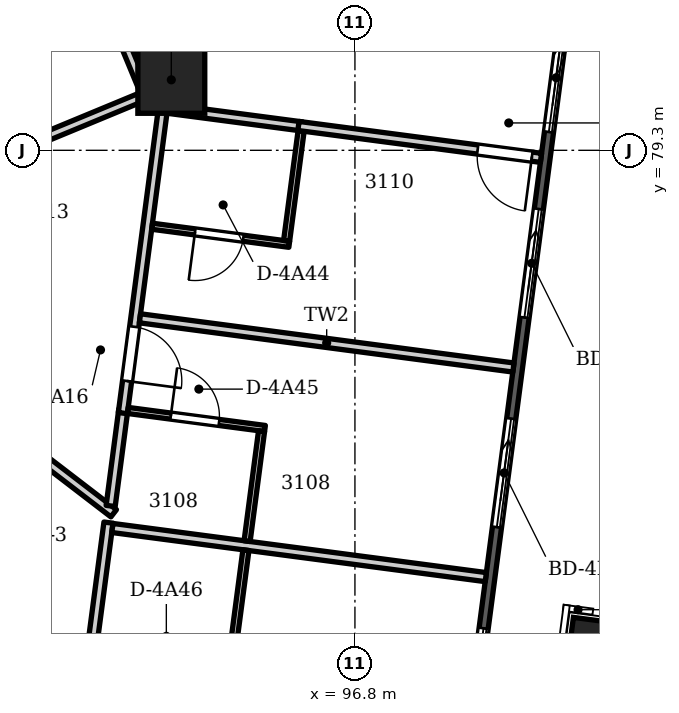
"""IFC4 building model, lengths in metres.
Left out: names, types, materials, properties, quantities, classifications, styles, units other than length and angle.
Written with IfcOpenShell. Run it as: python <this file> out.ifc"""

import sys

from ifc_helpers import new_model, si_unit, direction, frame, frame_2d, origin, origin_2d, place, context, subcontext, project, spatial, polyline, rectangle, circle, outline, extrude, element, fill, save


model = new_model("IFC4")
c1 = context("Model", 3, precision=1e-05, world=origin(), true_north=direction((0.0, 1.0)))
c2 = subcontext(c1, "Body", "Model", "MODEL_VIEW")
j1 = project(units=[si_unit("LENGTHUNIT", "METRE"), si_unit("PLANEANGLEUNIT", "RADIAN")], contexts=[c1])
p1 = place(None, origin())
s1 = spatial("IfcSite", under=j1, at=p1, CompositionType="ELEMENT")
p2 = place(p1, origin())
s2 = spatial("IfcBuilding", under=s1, at=p2, CompositionType="ELEMENT")
p3 = place(p2, frame((0.0, 0.0, 124.2)))
s3 = spatial("IfcBuildingStorey", under=s2, at=p3, CompositionType="ELEMENT", Elevation=124.2)
p4 = place(p3, frame((100.666, 71.205, -0.35), z_axis=(0.0, 0.0, 1.0), x_axis=(0.13052619222, 0.991444861374, 0.0)))
e1 = element("IfcColumn", 1, at=p4, inside=s3, PredefinedType="COLUMN", context=c2, shape_type="SweptSolid", body=[
    extrude(rectangle(XDim=0.75, YDim=0.65, at=origin_2d()), origin(), (0.0, 0.0, 1.0), 3.95),
])
p5 = place(p3, frame((93.78, 80.459, -0.35), z_axis=(0.0, 0.0, 1.0), x_axis=(1.0, 0.0, 0.0)))
e2 = element("IfcColumn", 2, at=p5, inside=s3, PredefinedType="COLUMN", context=c2, shape_type="SweptSolid", body=[
    extrude(circle(Radius=0.55, at=origin_2d()), origin(), (0.0, 0.0, 1.0), 3.95),
])
p6 = place(p3, frame((52.387, 70.1, 0.0), z_axis=(0.0, 0.0, 1.0), x_axis=(0.92388051416, 0.382681062447, 0.0)))
e3 = element("IfcWall", 3, at=p6, inside=s3, PredefinedType="SOLIDWALL", context=c2, shape_type="SweptSolid", body=[
    extrude(outline(polyline([(0.149, 0.075), (0.149, -0.075), (45.057, -0.075), (45.057, 0.075), (0.149, 0.075)])), origin(), (0.0, 0.0, 1.0), 3.3),
])
p7 = place(p6, frame((1.239, 0.0, 0.0)))
e4 = element("IfcOpeningElement", 4, at=p7, cuts=e3, PredefinedType="OPENING", context=c2, shape_type="SweptSolid", body=[
    extrude(rectangle(XDim=1.8, YDim=2.6, at=frame_2d((0.9, 1.3))), frame((0.0, 0.085, 0.0), z_axis=(0.0, -1.0, 0.0), x_axis=(1.0, 0.0, 0.0)), (0.0, 0.0, 1.0), 0.17),
])
p8 = place(p6, frame((4.316, 0.0, 0.0)))
e5 = element("IfcOpeningElement", 5, at=p8, cuts=e3, PredefinedType="OPENING", context=c2, shape_type="SweptSolid", body=[
    extrude(rectangle(XDim=1.8, YDim=2.6, at=frame_2d((0.9, 1.3))), frame((0.0, 0.085, 0.0), z_axis=(0.0, -1.0, 0.0), x_axis=(1.0, 0.0, 0.0)), (0.0, 0.0, 1.0), 0.17),
])
p9 = place(p6, frame((7.793, 0.0, 0.0)))
e6 = element("IfcOpeningElement", 6, at=p9, cuts=e3, PredefinedType="OPENING", context=c2, shape_type="SweptSolid", body=[
    extrude(rectangle(XDim=1.8, YDim=2.6, at=frame_2d((0.9, 1.3))), frame((0.0, 0.085, 0.0), z_axis=(0.0, -1.0, 0.0), x_axis=(1.0, 0.0, 0.0)), (0.0, 0.0, 1.0), 0.17),
])
p10 = place(p6, frame((11.271, 0.0, 0.0)))
e7 = element("IfcOpeningElement", 7, at=p10, cuts=e3, PredefinedType="OPENING", context=c2, shape_type="SweptSolid", body=[
    extrude(rectangle(XDim=1.8, YDim=2.6, at=frame_2d((0.9, 1.3))), frame((0.0, 0.085, 0.0), z_axis=(0.0, -1.0, 0.0), x_axis=(1.0, 0.0, 0.0)), (0.0, 0.0, 1.0), 0.17),
])
p11 = place(p6, frame((14.748, 0.0, 0.0)))
e8 = element("IfcOpeningElement", 8, at=p11, cuts=e3, PredefinedType="OPENING", context=c2, shape_type="SweptSolid", body=[
    extrude(rectangle(XDim=1.8, YDim=2.6, at=frame_2d((0.9, 1.3))), frame((0.0, 0.085, 0.0), z_axis=(0.0, -1.0, 0.0), x_axis=(1.0, 0.0, 0.0)), (0.0, 0.0, 1.0), 0.17),
])
p12 = place(p6, frame((18.226, 0.0, 0.0)))
e9 = element("IfcOpeningElement", 9, at=p12, cuts=e3, PredefinedType="OPENING", context=c2, shape_type="SweptSolid", body=[
    extrude(rectangle(XDim=1.8, YDim=2.6, at=frame_2d((0.9, 1.3))), frame((0.0, 0.085, 0.0), z_axis=(0.0, -1.0, 0.0), x_axis=(1.0, 0.0, 0.0)), (0.0, 0.0, 1.0), 0.17),
])
p13 = place(p6, frame((21.703, 0.0, 0.0)))
e10 = element("IfcOpeningElement", 10, at=p13, cuts=e3, PredefinedType="OPENING", context=c2, shape_type="SweptSolid", body=[
    extrude(rectangle(XDim=1.8, YDim=2.6, at=frame_2d((0.9, 1.3))), frame((0.0, 0.085, 0.0), z_axis=(0.0, -1.0, 0.0), x_axis=(1.0, 0.0, 0.0)), (0.0, 0.0, 1.0), 0.17),
])
p14 = place(p6, frame((25.18, 0.0, 0.0)))
e11 = element("IfcOpeningElement", 11, at=p14, cuts=e3, PredefinedType="OPENING", context=c2, shape_type="SweptSolid", body=[
    extrude(rectangle(XDim=1.8, YDim=2.6, at=frame_2d((0.9, 1.3))), frame((0.0, 0.085, 0.0), z_axis=(0.0, -1.0, 0.0), x_axis=(1.0, 0.0, 0.0)), (0.0, 0.0, 1.0), 0.17),
])
p15 = place(p6, frame((28.658, 0.0, 0.0)))
e12 = element("IfcOpeningElement", 12, at=p15, cuts=e3, PredefinedType="OPENING", context=c2, shape_type="SweptSolid", body=[
    extrude(rectangle(XDim=1.8, YDim=2.6, at=frame_2d((0.9, 1.3))), frame((0.0, 0.085, 0.0), z_axis=(0.0, -1.0, 0.0), x_axis=(1.0, 0.0, 0.0)), (0.0, 0.0, 1.0), 0.17),
])
p16 = place(p6, frame((32.135, 0.0, 0.0)))
e13 = element("IfcOpeningElement", 13, at=p16, cuts=e3, PredefinedType="OPENING", context=c2, shape_type="SweptSolid", body=[
    extrude(rectangle(XDim=1.8, YDim=2.6, at=frame_2d((0.9, 1.3))), frame((0.0, 0.085, 0.0), z_axis=(0.0, -1.0, 0.0), x_axis=(1.0, 0.0, 0.0)), (0.0, 0.0, 1.0), 0.17),
])
p17 = place(p6, frame((35.613, 0.0, 0.0)))
e14 = element("IfcOpeningElement", 14, at=p17, cuts=e3, PredefinedType="OPENING", context=c2, shape_type="SweptSolid", body=[
    extrude(rectangle(XDim=1.8, YDim=2.6, at=frame_2d((0.9, 1.3))), frame((0.0, 0.085, 0.0), z_axis=(0.0, -1.0, 0.0), x_axis=(1.0, 0.0, 0.0)), (0.0, 0.0, 1.0), 0.17),
])
p18 = place(p6, frame((39.09, 0.0, 0.0)))
e15 = element("IfcOpeningElement", 15, at=p18, cuts=e3, PredefinedType="OPENING", context=c2, shape_type="SweptSolid", body=[
    extrude(rectangle(XDim=1.8, YDim=2.6, at=frame_2d((0.9, 1.3))), frame((0.0, 0.085, 0.0), z_axis=(0.0, -1.0, 0.0), x_axis=(1.0, 0.0, 0.0)), (0.0, 0.0, 1.0), 0.17),
])
p19 = place(p6, frame((42.167, 0.0, 0.0)))
e16 = element("IfcOpeningElement", 16, at=p19, cuts=e3, PredefinedType="OPENING", context=c2, shape_type="SweptSolid", body=[
    extrude(rectangle(XDim=1.8, YDim=2.6, at=frame_2d((0.9, 1.3))), frame((0.0, 0.085, 0.0), z_axis=(0.0, -1.0, 0.0), x_axis=(1.0, 0.0, 0.0)), (0.0, 0.0, 1.0), 0.17),
])
p20 = place(p3, frame((100.388, 82.614, 0.0), z_axis=(0.0, 0.0, 1.0), x_axis=(-0.130522128443, -0.991445396372, 0.0)))
e17 = element("IfcWall", 17, at=p20, inside=s3, PredefinedType="SOLIDWALL", context=c2, shape_type="SweptSolid", body=[
    extrude(outline(polyline([(0.149, 0.075), (0.149, -0.075), (45.057, -0.075), (45.057, 0.075), (0.149, 0.075)])), origin(), (0.0, 0.0, 1.0), 3.3),
])
p21 = place(p20, frame((1.239, 0.0, 0.0)))
e18 = element("IfcOpeningElement", 18, at=p21, cuts=e17, PredefinedType="OPENING", context=c2, shape_type="SweptSolid", body=[
    extrude(rectangle(XDim=1.8, YDim=2.6, at=frame_2d((0.9, 1.3))), frame((0.0, 0.085, 0.0), z_axis=(0.0, -1.0, 0.0), x_axis=(1.0, 0.0, 0.0)), (0.0, 0.0, 1.0), 0.17),
])
p22 = place(p20, frame((4.316, 0.0, 0.0)))
e19 = element("IfcOpeningElement", 19, at=p22, cuts=e17, PredefinedType="OPENING", context=c2, shape_type="SweptSolid", body=[
    extrude(rectangle(XDim=1.8, YDim=2.6, at=frame_2d((0.9, 1.3))), frame((0.0, 0.085, 0.0), z_axis=(0.0, -1.0, 0.0), x_axis=(1.0, 0.0, 0.0)), (0.0, 0.0, 1.0), 0.17),
])
p23 = place(p20, frame((7.793, 0.0, 0.0)))
e20 = element("IfcOpeningElement", 20, at=p23, cuts=e17, PredefinedType="OPENING", context=c2, shape_type="SweptSolid", body=[
    extrude(rectangle(XDim=1.8, YDim=2.6, at=frame_2d((0.9, 1.3))), frame((0.0, 0.085, 0.0), z_axis=(0.0, -1.0, 0.0), x_axis=(1.0, 0.0, 0.0)), (0.0, 0.0, 1.0), 0.17),
])
p24 = place(p20, frame((11.271, 0.0, 0.0)))
e21 = element("IfcOpeningElement", 21, at=p24, cuts=e17, PredefinedType="OPENING", context=c2, shape_type="SweptSolid", body=[
    extrude(rectangle(XDim=1.8, YDim=2.6, at=frame_2d((0.9, 1.3))), frame((0.0, 0.085, 0.0), z_axis=(0.0, -1.0, 0.0), x_axis=(1.0, 0.0, 0.0)), (0.0, 0.0, 1.0), 0.17),
])
p25 = place(p20, frame((14.748, 0.0, 0.0)))
e22 = element("IfcOpeningElement", 22, at=p25, cuts=e17, PredefinedType="OPENING", context=c2, shape_type="SweptSolid", body=[
    extrude(rectangle(XDim=1.8, YDim=2.6, at=frame_2d((0.9, 1.3))), frame((0.0, 0.085, 0.0), z_axis=(0.0, -1.0, 0.0), x_axis=(1.0, 0.0, 0.0)), (0.0, 0.0, 1.0), 0.17),
])
p26 = place(p20, frame((18.226, 0.0, 0.0)))
e23 = element("IfcOpeningElement", 23, at=p26, cuts=e17, PredefinedType="OPENING", context=c2, shape_type="SweptSolid", body=[
    extrude(rectangle(XDim=1.8, YDim=2.6, at=frame_2d((0.9, 1.3))), frame((0.0, 0.085, 0.0), z_axis=(0.0, -1.0, 0.0), x_axis=(1.0, 0.0, 0.0)), (0.0, 0.0, 1.0), 0.17),
])
p27 = place(p20, frame((21.703, 0.0, 0.0)))
e24 = element("IfcOpeningElement", 24, at=p27, cuts=e17, PredefinedType="OPENING", context=c2, shape_type="SweptSolid", body=[
    extrude(rectangle(XDim=1.8, YDim=2.6, at=frame_2d((0.9, 1.3))), frame((0.0, 0.085, 0.0), z_axis=(0.0, -1.0, 0.0), x_axis=(1.0, 0.0, 0.0)), (0.0, 0.0, 1.0), 0.17),
])
p28 = place(p20, frame((25.18, 0.0, 0.0)))
e25 = element("IfcOpeningElement", 25, at=p28, cuts=e17, PredefinedType="OPENING", context=c2, shape_type="SweptSolid", body=[
    extrude(rectangle(XDim=1.8, YDim=2.6, at=frame_2d((0.9, 1.3))), frame((0.0, 0.085, 0.0), z_axis=(0.0, -1.0, 0.0), x_axis=(1.0, 0.0, 0.0)), (0.0, 0.0, 1.0), 0.17),
])
p29 = place(p20, frame((28.658, 0.0, 0.0)))
e26 = element("IfcOpeningElement", 26, at=p29, cuts=e17, PredefinedType="OPENING", context=c2, shape_type="SweptSolid", body=[
    extrude(rectangle(XDim=1.8, YDim=2.6, at=frame_2d((0.9, 1.3))), frame((0.0, 0.085, 0.0), z_axis=(0.0, -1.0, 0.0), x_axis=(1.0, 0.0, 0.0)), (0.0, 0.0, 1.0), 0.17),
])
p30 = place(p20, frame((32.135, 0.0, 0.0)))
e27 = element("IfcOpeningElement", 27, at=p30, cuts=e17, PredefinedType="OPENING", context=c2, shape_type="SweptSolid", body=[
    extrude(rectangle(XDim=1.8, YDim=2.6, at=frame_2d((0.9, 1.3))), frame((0.0, 0.085, 0.0), z_axis=(0.0, -1.0, 0.0), x_axis=(1.0, 0.0, 0.0)), (0.0, 0.0, 1.0), 0.17),
])
p31 = place(p20, frame((35.613, 0.0, 0.0)))
e28 = element("IfcOpeningElement", 28, at=p31, cuts=e17, PredefinedType="OPENING", context=c2, shape_type="SweptSolid", body=[
    extrude(rectangle(XDim=1.8, YDim=2.6, at=frame_2d((0.9, 1.3))), frame((0.0, 0.085, 0.0), z_axis=(0.0, -1.0, 0.0), x_axis=(1.0, 0.0, 0.0)), (0.0, 0.0, 1.0), 0.17),
])
p32 = place(p20, frame((39.09, 0.0, 0.0)))
e29 = element("IfcOpeningElement", 29, at=p32, cuts=e17, PredefinedType="OPENING", context=c2, shape_type="SweptSolid", body=[
    extrude(rectangle(XDim=1.8, YDim=2.6, at=frame_2d((0.9, 1.3))), frame((0.0, 0.085, 0.0), z_axis=(0.0, -1.0, 0.0), x_axis=(1.0, 0.0, 0.0)), (0.0, 0.0, 1.0), 0.17),
])
p33 = place(p20, frame((42.167, 0.0, 0.0)))
e30 = element("IfcOpeningElement", 30, at=p33, cuts=e17, PredefinedType="OPENING", context=c2, shape_type="SweptSolid", body=[
    extrude(rectangle(XDim=1.8, YDim=2.6, at=frame_2d((0.9, 1.3))), frame((0.0, 0.085, 0.0), z_axis=(0.0, -1.0, 0.0), x_axis=(1.0, 0.0, 0.0)), (0.0, 0.0, 1.0), 0.17),
])
p34 = place(p3, origin())
e31 = element("IfcWall", 31, at=p34, inside=s3, PredefinedType="PARAPET", context=c2, shape_type="SweptSolid", body=[
    extrude(outline(polyline([(99.222, 55.637), (107.395, 84.139), (107.059, 84.055), (99.487, 57.649), (99.222, 55.637)])), origin(), (0.0, 0.0, 1.0), 1.1),
])
p35 = place(p3, frame((87.26, 77.607, 0.0), z_axis=(0.0, 0.0, 1.0), x_axis=(0.79336631803, -0.608744515718, 0.0)))
e32 = element("IfcWall", 32, at=p35, inside=s3, PredefinedType="PARTITIONING", context=c2, shape_type="SweptSolid", body=[
    extrude(rectangle(XDim=7.024, YDim=0.15, at=frame_2d((3.512, 0.0))), origin(), (0.0, 0.0, 1.0), 2.7),
])
p36 = place(p35, frame((1.086, 0.0, 0.0)))
e33 = element("IfcOpeningElement", 33, at=p36, cuts=e32, PredefinedType="OPENING", context=c2, shape_type="SweptSolid", body=[
    extrude(rectangle(XDim=1.8, YDim=2.1, at=frame_2d((0.9, 1.05))), frame((0.0, 0.085, 0.0), z_axis=(0.0, -1.0, 0.0), x_axis=(1.0, 0.0, 0.0)), (0.0, 0.0, 1.0), 0.17),
])
p37 = place(p3, frame((88.693, 78.272, 0.0), z_axis=(0.0, 0.0, 1.0), x_axis=(0.92395946552, 0.382490399978, 0.0)))
e34 = element("IfcWall", 34, at=p37, inside=s3, PredefinedType="PARTITIONING", context=c2, shape_type="SweptSolid", body=[
    extrude(rectangle(XDim=5.134, YDim=0.15, at=frame_2d((2.567, 0.0))), origin(), (0.0, 0.0, 1.0), 2.8),
])
p38 = place(p37, frame((0.531, 0.0, 0.0)))
e35 = element("IfcOpeningElement", 35, at=p38, cuts=e34, PredefinedType="OPENING", context=c2, shape_type="SweptSolid", body=[
    extrude(rectangle(XDim=0.9, YDim=2.1, at=frame_2d((0.45, 1.05))), frame((0.0, 0.085, 0.0), z_axis=(0.0, -1.0, 0.0), x_axis=(1.0, 0.0, 0.0)), (0.0, 0.0, 1.0), 0.17),
])
p39 = place(p3, frame((92.486, 82.336, 0.0), z_axis=(0.0, 0.0, 1.0), x_axis=(0.382374366103, -0.924007491391, 0.0)))
e36 = element("IfcWall", 36, at=p39, inside=s3, PredefinedType="PARTITIONING", context=c2, shape_type="SweptSolid", body=[
    extrude(rectangle(XDim=2.229, YDim=0.15, at=frame_2d((1.115, 0.0))), origin(), (0.0, 0.0, 1.0), 3.3),
])
p40 = place(p3, frame((92.49, 71.23, 0.0), z_axis=(0.0, 0.0, 1.0), x_axis=(0.130747069904, 0.991415757244, 0.0)))
e37 = element("IfcWall", 37, at=p40, inside=s3, PredefinedType="PARTITIONING", context=c2, shape_type="SweptSolid", body=[
    extrude(rectangle(XDim=1.964, YDim=0.15, at=frame_2d((0.982, 0.0))), origin(), (0.0, 0.0, 1.0), 3.3),
])
p41 = place(p3, frame((92.811, 73.089, 0.0), z_axis=(0.0, 0.0, 1.0), x_axis=(0.991458051546, -0.130425963766, 0.0)))
e38 = element("IfcWall", 38, at=p41, inside=s3, PredefinedType="PARTITIONING", context=c2, shape_type="SweptSolid", body=[
    extrude(rectangle(XDim=6.194, YDim=0.15, at=frame_2d((3.097, 0.0))), origin(), (0.0, 0.0, 1.0), 3.3),
])
p42 = place(p3, frame((92.783, 73.451, 0.0), z_axis=(0.0, 0.0, 1.0), x_axis=(0.130312245432, 0.991473004519, 0.0)))
e39 = element("IfcWall", 39, at=p42, inside=s3, PredefinedType="PARTITIONING", context=c2, shape_type="SweptSolid", body=[
    extrude(rectangle(XDim=1.598, YDim=0.15, at=frame_2d((0.799, 0.0))), origin(), (0.0, 0.0, 1.0), 3.3),
])
p43 = place(p3, frame((92.983, 74.979, 0.0), z_axis=(0.0, 0.0, 1.0), x_axis=(0.130587368937, 0.991436805386, 0.0)))
e40 = element("IfcWall", 40, at=p43, inside=s3, PredefinedType="PARTITIONING", context=c2, shape_type="SweptSolid", body=[
    extrude(rectangle(XDim=5.134, YDim=0.15, at=frame_2d((2.567, 0.0))), origin(), (0.0, 0.0, 1.0), 2.8),
])
p44 = place(p43, frame((0.532, 0.0, 0.0)))
e41 = element("IfcOpeningElement", 41, at=p44, cuts=e40, PredefinedType="OPENING", context=c2, shape_type="SweptSolid", body=[
    extrude(rectangle(XDim=0.9, YDim=2.1, at=frame_2d((0.45, 1.05))), frame((0.0, 0.085, 0.0), z_axis=(0.0, -1.0, 0.0), x_axis=(1.0, 0.0, 0.0)), (0.0, 0.0, 1.0), 0.17),
])
p45 = place(p3, frame((93.065, 75.022, 0.0), z_axis=(0.0, 0.0, 1.0), x_axis=(0.991459774706, -0.130412864162, 0.0)))
e42 = element("IfcWall", 42, at=p45, inside=s3, PredefinedType="PARTITIONING", context=c2, shape_type="SweptSolid", body=[
    extrude(rectangle(XDim=2.275, YDim=0.1, at=frame_2d((1.137, 0.0))), origin(), (0.0, 0.0, 1.0), 3.3),
])
p46 = place(p45, frame((0.712, 0.0, 0.0)))
e43 = element("IfcOpeningElement", 43, at=p46, cuts=e42, PredefinedType="OPENING", context=c2, shape_type="SweptSolid", body=[
    extrude(rectangle(XDim=0.8, YDim=2.1, at=frame_2d((0.4, 1.05))), frame((0.0, 0.06, 0.0), z_axis=(0.0, -1.0, 0.0), x_axis=(1.0, 0.0, 0.0)), (0.0, 0.0, 1.0), 0.12),
])
p47 = place(p3, frame((93.264, 76.537, 0.0), z_axis=(0.0, 0.0, 1.0), x_axis=(0.991439668145, -0.130565632649, 0.0)))
e44 = element("IfcWall", 44, at=p47, inside=s3, PredefinedType="PARTITIONING", context=c2, shape_type="SweptSolid", body=[
    extrude(rectangle(XDim=6.195, YDim=0.15, at=frame_2d((3.097, 0.0))), origin(), (0.0, 0.0, 1.0), 3.3),
])
p48 = place(p3, frame((93.464, 78.051, 0.0), z_axis=(0.0, 0.0, 1.0), x_axis=(0.991445890878, -0.130518372124, 0.0)))
e45 = element("IfcWall", 45, at=p48, inside=s3, PredefinedType="PARTITIONING", context=c2, shape_type="SweptSolid", body=[
    extrude(rectangle(XDim=2.275, YDim=0.1, at=frame_2d((1.137, 0.0))), origin(), (0.0, 0.0, 1.0), 3.3),
])
p49 = place(p48, frame((0.712, 0.0, 0.0)))
e46 = element("IfcOpeningElement", 46, at=p49, cuts=e45, PredefinedType="OPENING", context=c2, shape_type="SweptSolid", body=[
    extrude(rectangle(XDim=0.8, YDim=2.1, at=frame_2d((0.4, 1.05))), frame((0.0, 0.06, 0.0), z_axis=(0.0, -1.0, 0.0), x_axis=(1.0, 0.0, 0.0)), (0.0, 0.0, 1.0), 0.12),
])
p50 = place(p3, frame((93.719, 79.984, 0.0), z_axis=(0.0, 0.0, 1.0), x_axis=(0.991444602233, -0.130528160577, 0.0)))
e47 = element("IfcWall", 47, at=p50, inside=s3, PredefinedType="PARTITIONING", context=c2, shape_type="SweptSolid", body=[
    extrude(rectangle(XDim=2.229, YDim=0.15, at=frame_2d((1.115, 0.0))), origin(), (0.0, 0.0, 1.0), 3.3),
])
p51 = place(p3, frame((94.742, 70.717, 0.0), z_axis=(0.0, 0.0, 1.0), x_axis=(0.130663420693, 0.991426785241, 0.0)))
e48 = element("IfcWall", 48, at=p51, inside=s3, PredefinedType="PARTITIONING", context=c2, shape_type="SweptSolid", body=[
    extrude(rectangle(XDim=2.025, YDim=0.1, at=frame_2d((1.013, 0.0))), origin(), (0.0, 0.0, 1.0), 3.3),
])
for number, where, z_axis, x_axis in (
    (49, (95.027, 72.873, 0.0), (0.0, 0.0, 1.0), (0.13, 0.991, 0.0)),
    (50, (95.677, 77.811, 0.0), (0.0, 0.0, 1.0), (0.131, 0.991, 0.0)),
):
    element("IfcWall", number, at=place(p3, frame(where, z_axis=z_axis, x_axis=x_axis)), inside=s3, PredefinedType="PARTITIONING", context=c2, shape_type="SweptSolid", body=[
        extrude(rectangle(XDim=1.825, YDim=0.1, at=frame_2d((0.912, 0.0))), origin(), (0.0, 0.0, 1.0), 3.3),
    ])
p52 = place(p3, frame((95.871, 79.7, 0.0), z_axis=(0.0, 0.0, 1.0), x_axis=(0.991472672227, -0.130314773632, 0.0)))
e51 = element("IfcWall", 51, at=p52, inside=s3, PredefinedType="PARTITIONING", context=c2, shape_type="SweptSolid", body=[
    extrude(rectangle(XDim=4.022, YDim=0.15, at=frame_2d((2.011, 0.0))), origin(), (0.0, 0.0, 1.0), 3.3),
])
p53 = place(p52, frame((2.972, 0.0, 0.0)))
e52 = element("IfcOpeningElement", 52, at=p53, cuts=e51, PredefinedType="OPENING", context=c2, shape_type="SweptSolid", body=[
    extrude(rectangle(XDim=0.9, YDim=2.1, at=frame_2d((0.45, 1.05))), frame((0.0, 0.085, 0.0), z_axis=(0.0, -1.0, 0.0), x_axis=(1.0, 0.0, 0.0)), (0.0, 0.0, 1.0), 0.17),
])
p54 = place(p21, origin())
e53 = element("IfcDoor", 53, at=p54, inside=s3, OperationType="SLIDING_TO_LEFT", PredefinedType="DOOR", context=c2, shape_type="SweptSolid", body=[
    extrude(rectangle(XDim=1.8, YDim=2.6, at=frame_2d((0.9, 1.3))), frame((0.0, 0.025, 0.0), z_axis=(0.0, -1.0, 0.0), x_axis=(1.0, 0.0, 0.0)), (0.0, 0.0, 1.0), 0.05),
])
fill(e18, e53)
p55 = place(p22, origin())
e54 = element("IfcDoor", 54, at=p55, inside=s3, OperationType="SLIDING_TO_LEFT", PredefinedType="DOOR", context=c2, shape_type="SweptSolid", body=[
    extrude(rectangle(XDim=1.8, YDim=2.6, at=frame_2d((0.9, 1.3))), frame((0.0, 0.025, 0.0), z_axis=(0.0, -1.0, 0.0), x_axis=(1.0, 0.0, 0.0)), (0.0, 0.0, 1.0), 0.05),
])
fill(e19, e54)
p56 = place(p23, origin())
e55 = element("IfcDoor", 55, at=p56, inside=s3, OperationType="SLIDING_TO_LEFT", PredefinedType="DOOR", context=c2, shape_type="SweptSolid", body=[
    extrude(rectangle(XDim=1.8, YDim=2.6, at=frame_2d((0.9, 1.3))), frame((0.0, 0.025, 0.0), z_axis=(0.0, -1.0, 0.0), x_axis=(1.0, 0.0, 0.0)), (0.0, 0.0, 1.0), 0.05),
])
fill(e20, e55)
p57 = place(p24, origin())
e56 = element("IfcDoor", 56, at=p57, inside=s3, OperationType="SLIDING_TO_LEFT", PredefinedType="DOOR", context=c2, shape_type="SweptSolid", body=[
    extrude(rectangle(XDim=1.8, YDim=2.6, at=frame_2d((0.9, 1.3))), frame((0.0, 0.025, 0.0), z_axis=(0.0, -1.0, 0.0), x_axis=(1.0, 0.0, 0.0)), (0.0, 0.0, 1.0), 0.05),
])
fill(e21, e56)
p58 = place(p53, frame((0.9, 0.0, 0.0), z_axis=(0.0, 0.0, 1.0), x_axis=(-1.0, 0.0, 0.0)))
e57 = element("IfcDoor", 57, at=p58, inside=s3, OperationType="SINGLE_SWING_LEFT", PredefinedType="DOOR", context=c2, shape_type="SweptSolid", body=[
    extrude(rectangle(XDim=0.9, YDim=2.1, at=frame_2d((0.45, 1.05))), frame((0.0, 0.025, 0.0), z_axis=(0.0, -1.0, 0.0), x_axis=(1.0, 0.0, 0.0)), (0.0, 0.0, 1.0), 0.05),
])
fill(e52, e57)
p59 = place(p44, frame((0.9, 0.0, 0.0), z_axis=(0.0, 0.0, 1.0), x_axis=(-1.0, 0.0, 0.0)))
e58 = element("IfcDoor", 58, at=p59, inside=s3, OperationType="SINGLE_SWING_RIGHT", PredefinedType="DOOR", context=c2, shape_type="SweptSolid", body=[
    extrude(rectangle(XDim=0.9, YDim=2.1, at=frame_2d((0.45, 1.05))), frame((0.0, 0.025, 0.0), z_axis=(0.0, -1.0, 0.0), x_axis=(1.0, 0.0, 0.0)), (0.0, 0.0, 1.0), 0.05),
])
fill(e41, e58)
p60 = place(p49, frame((0.8, 0.0, 0.0), z_axis=(0.0, 0.0, 1.0), x_axis=(-1.0, 0.0, 0.0)))
e59 = element("IfcDoor", 59, at=p60, inside=s3, OperationType="SINGLE_SWING_RIGHT", PredefinedType="DOOR", context=c2, shape_type="SweptSolid", body=[
    extrude(rectangle(XDim=0.8, YDim=2.1, at=frame_2d((0.4, 1.05))), frame((0.0, 0.025, 0.0), z_axis=(0.0, -1.0, 0.0), x_axis=(1.0, 0.0, 0.0)), (0.0, 0.0, 1.0), 0.05),
])
fill(e46, e59)
p61 = place(p46, origin())
e60 = element("IfcDoor", 60, at=p61, inside=s3, OperationType="SINGLE_SWING_LEFT", PredefinedType="DOOR", context=c2, shape_type="SweptSolid", body=[
    extrude(rectangle(XDim=0.8, YDim=2.1, at=frame_2d((0.4, 1.05))), frame((0.0, 0.025, 0.0), z_axis=(0.0, -1.0, 0.0), x_axis=(1.0, 0.0, 0.0)), (0.0, 0.0, 1.0), 0.05),
])
fill(e43, e60)
save(model, sys.argv[1])
